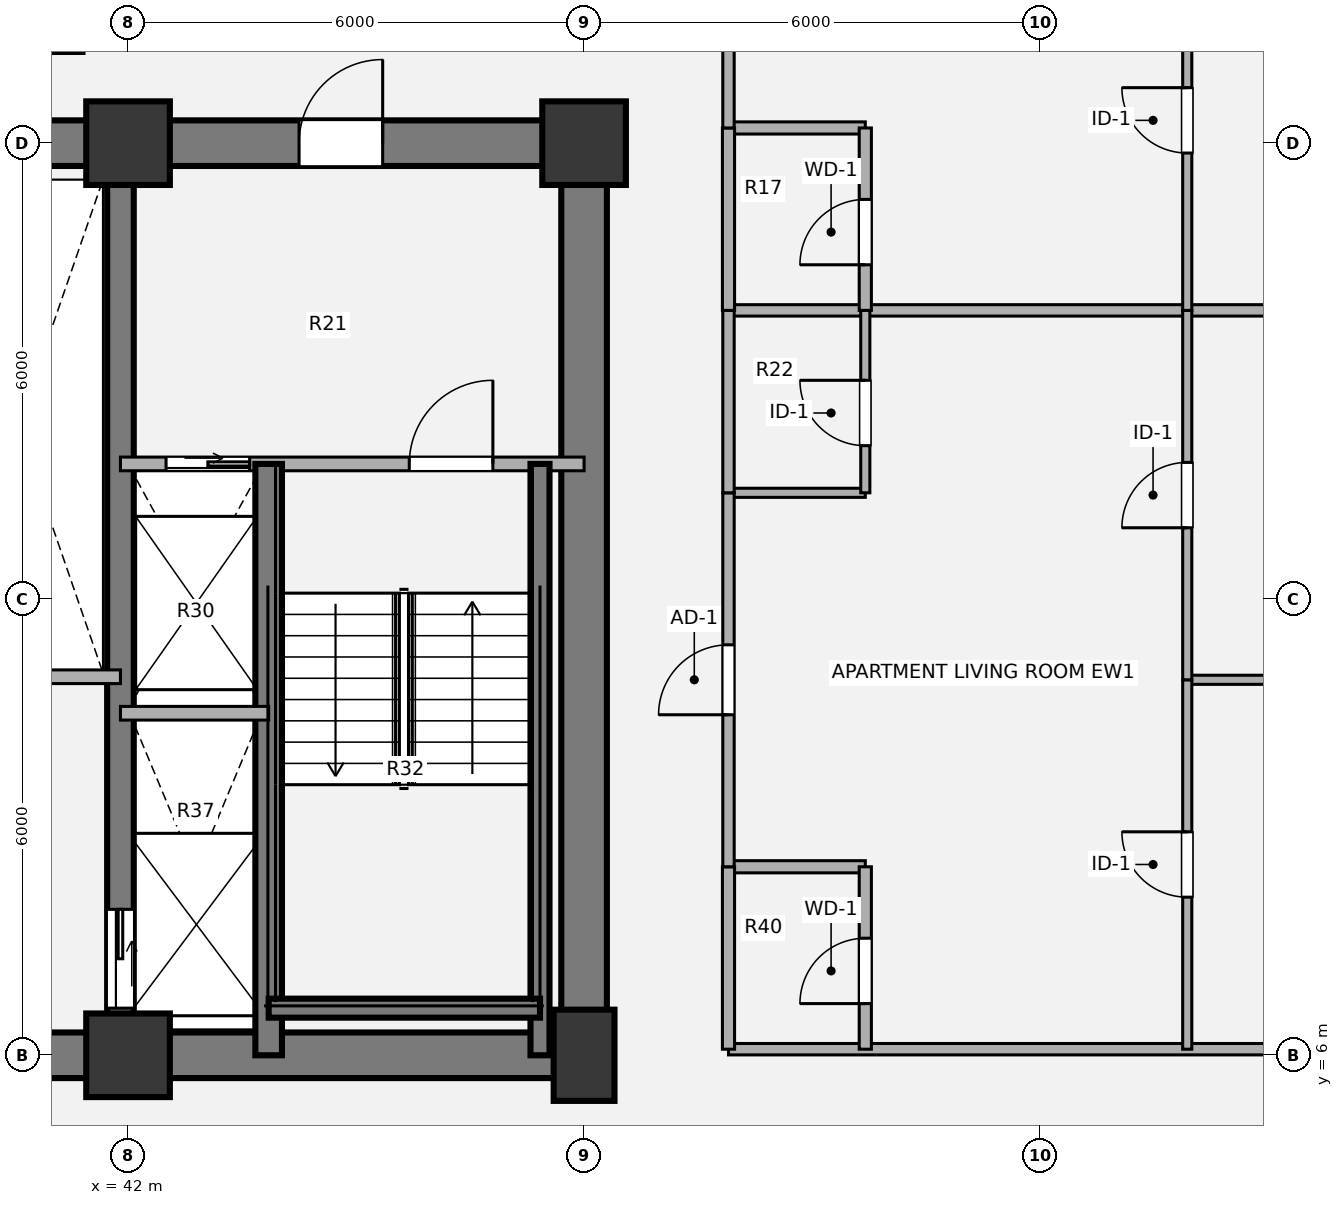
"""IFC4 building model, lengths in metres.
Left out: names, types, materials, properties, quantities, classifications, styles, units other than length and angle.
Written with IfcOpenShell. Run it as: python <this file> out.ifc"""

import sys

from ifc_helpers import new_model, si_unit, direction, frame, frame_2d, origin, origin_2d, place, context, subcontext, project, spatial, rectangle, extrude, source, transform, mapped, element, fill, save


model = new_model("IFC4")
c1 = context("Model", 3, precision=1e-05, world=origin(), true_north=direction((0.0, 1.0)))
c2 = subcontext(c1, "Body", "Model", "MODEL_VIEW")
j1 = project(units=[si_unit("LENGTHUNIT", "METRE"), si_unit("PLANEANGLEUNIT", "RADIAN")], contexts=[c1])
p1 = place(None, origin())
s1 = spatial("IfcSite", under=j1, at=p1, CompositionType="ELEMENT")
p2 = place(p1, origin())
s2 = spatial("IfcBuilding", under=s1, at=p2, CompositionType="ELEMENT")
p3 = place(p2, frame((0.0, 0.0, 76.14)))
s3 = spatial("IfcBuildingStorey", under=s2, at=p3, CompositionType="ELEMENT", Elevation=76.14)
m1 = source(origin(), c2, "Body", "SweptSolid", [
    extrude(rectangle(XDim=1.1, YDim=1.1, at=origin_2d()), origin(), (0.0, 0.0, 1.0), 3.78),
])
p4 = place(p3, frame((42.0, 6.0, 0.0), z_axis=(0.0, 0.0, 1.0), x_axis=(1.0, 0.0, 0.0)))
e1 = element("IfcColumn", 1, at=p4, inside=s3, PredefinedType="COLUMN", context=c2, shape_type="MappedRepresentation", body=[
    mapped(m1, transform((0.0, 0.0, 0.0), x_axis=(1.0, 0.0, 0.0), y_axis=(0.0, 1.0, 0.0), z_axis=(0.0, 0.0, 1.0), scale=1.0)),
])
m2 = source(origin(), c2, "Body", "SweptSolid", [
    extrude(rectangle(XDim=0.8, YDim=1.2, at=origin_2d()), origin(), (0.0, 0.0, 1.0), 3.78),
])
p5 = place(p3, frame((48.0, 6.0, 0.0), z_axis=(0.0, 0.0, 1.0), x_axis=(1.0, 0.0, 0.0)))
e2 = element("IfcColumn", 2, at=p5, inside=s3, PredefinedType="COLUMN", context=c2, shape_type="MappedRepresentation", body=[
    mapped(m2, transform((0.0, 0.0, 0.0), x_axis=(1.0, 0.0, 0.0), y_axis=(0.0, 1.0, 0.0), z_axis=(0.0, 0.0, 1.0), scale=1.0)),
])
for number, where, z_axis, x_axis in (
    (3, (42.0, 18.0, 0.0), (0.0, 0.0, 1.0), (1.0, 0.0, 0.0)),
    (4, (48.0, 18.0, 0.0), (0.0, 0.0, 1.0), (1.0, 0.0, 0.0)),
):
    element("IfcColumn", number, at=place(p3, frame(where, z_axis=z_axis, x_axis=x_axis)), inside=s3, PredefinedType="COLUMN", context=c2, shape_type="MappedRepresentation", body=[
        mapped(m1, transform((0.0, 0.0, 0.0), x_axis=(1.0, 0.0, 0.0), y_axis=(0.0, 1.0, 0.0), z_axis=(0.0, 0.0, 1.0), scale=1.0)),
    ])
p6 = place(p3, frame((48.3, 6.0, 0.0), z_axis=(0.0, 0.0, 1.0), x_axis=(-1.0, 0.0, 0.0)))
e5 = element("IfcWall", 5, at=p6, inside=s3, PredefinedType="SHEAR", context=c2, shape_type="SweptSolid", body=[
    extrude(rectangle(XDim=24.6, YDim=0.6, at=frame_2d((12.3, 0.0))), origin(), (0.0, 0.0, 1.0), 3.78),
])
p7 = place(p3, frame((48.0, 18.0, 0.0), z_axis=(0.0, 0.0, 1.0), x_axis=(0.0, -1.0, 0.0)))
e6 = element("IfcWall", 6, at=p7, inside=s3, PredefinedType="SHEAR", context=c2, shape_type="SweptSolid", body=[
    extrude(rectangle(XDim=12.0, YDim=0.6, at=frame_2d((6.0, 0.0))), origin(), (0.0, 0.0, 1.0), 3.78),
])
p8 = place(p3, frame((38.8, 18.0, 0.0), z_axis=(0.0, 0.0, 1.0), x_axis=(1.0, 0.0, 0.0)))
e7 = element("IfcWall", 7, at=p8, inside=s3, PredefinedType="SHEAR", context=c2, shape_type="SweptSolid", body=[
    extrude(rectangle(XDim=9.5, YDim=0.6, at=frame_2d((4.75, 0.0))), origin(), (0.0, 0.0, 1.0), 3.78),
])
p9 = place(p8, frame((5.45, 0.0, 0.0)))
e8 = element("IfcOpeningElement", 8, at=p9, cuts=e7, PredefinedType="OPENING", context=c2, shape_type="SweptSolid", body=[
    extrude(rectangle(XDim=1.1, YDim=2.1, at=origin_2d()), frame((0.55, 0.31, 1.05), z_axis=(0.0, -1.0, 0.0), x_axis=(1.0, 0.0, 0.0)), (0.0, 0.0, 1.0), 0.62),
])
p10 = place(p3, frame((41.9, 18.0, 0.0), z_axis=(0.0, 0.0, 1.0), x_axis=(0.0, -1.0, 0.0)))
e9 = element("IfcWall", 9, at=p10, inside=s3, PredefinedType="SHEAR", context=c2, shape_type="SweptSolid", body=[
    extrude(rectangle(XDim=12.0, YDim=0.35, at=frame_2d((6.0, 0.0))), origin(), (0.0, 0.0, 1.0), 3.78),
])
p11 = place(p10, frame((10.08, 0.0, 0.0)))
e10 = element("IfcOpeningElement", 10, at=p11, cuts=e9, PredefinedType="OPENING", context=c2, shape_type="SweptSolid", body=[
    extrude(rectangle(XDim=1.3, YDim=2.1, at=origin_2d()), frame((0.65, 0.185, 1.05), z_axis=(0.0, -1.0, 0.0), x_axis=(1.0, 0.0, 0.0)), (0.0, 0.0, 1.0), 0.37),
])
p12 = place(p3, frame((39.35, 10.98, 0.0), z_axis=(0.0, 0.0, 1.0), x_axis=(1.0, 0.0, 0.0)))
e11 = element("IfcWall", 11, at=p12, inside=s3, PredefinedType="PARTITIONING", context=c2, shape_type="SweptSolid", body=[
    extrude(rectangle(XDim=2.55, YDim=0.18, at=frame_2d((1.275, 0.0))), origin(), (0.0, 0.0, 1.0), 3.342),
])
p13 = place(p3, frame((41.9, 13.78, 0.0), z_axis=(0.0, 0.0, 1.0), x_axis=(1.0, 0.0, 0.0)))
e12 = element("IfcWall", 12, at=p13, inside=s3, PredefinedType="PARTITIONING", context=c2, shape_type="SweptSolid", body=[
    extrude(rectangle(XDim=6.1, YDim=0.18, at=frame_2d((3.05, 0.0))), origin(), (0.0, 0.0, 1.0), 3.342),
])
p14 = place(p13, frame((0.6, 0.0, 0.0)))
e13 = element("IfcOpeningElement", 13, at=p14, cuts=e12, PredefinedType="OPENING", context=c2, shape_type="SweptSolid", body=[
    extrude(rectangle(XDim=1.1, YDim=2.1, at=origin_2d()), frame((0.55, 0.1, 1.05), z_axis=(0.0, -1.0, 0.0), x_axis=(1.0, 0.0, 0.0)), (0.0, 0.0, 1.0), 0.2),
])
p15 = place(p13, frame((3.8, 0.0, 0.0)))
e14 = element("IfcOpeningElement", 14, at=p15, cuts=e12, PredefinedType="OPENING", context=c2, shape_type="SweptSolid", body=[
    extrude(rectangle(XDim=1.1, YDim=2.1, at=origin_2d()), frame((0.55, 0.1, 1.05), z_axis=(0.0, -1.0, 0.0), x_axis=(1.0, 0.0, 0.0)), (0.0, 0.0, 1.0), 0.2),
])
p16 = place(p3, frame((43.85, 6.0, 0.0), z_axis=(0.0, 0.0, 1.0), x_axis=(0.0, 1.0, 0.0)))
e15 = element("IfcWall", 15, at=p16, inside=s3, PredefinedType="SHEAR", context=c2, shape_type="SweptSolid", body=[
    extrude(rectangle(XDim=7.78, YDim=0.35, at=frame_2d((3.89, 0.0))), origin(), (0.0, 0.0, 1.0), 3.692),
])
p17 = place(p3, frame((47.42, 6.0, 0.0), z_axis=(0.0, 0.0, 1.0), x_axis=(0.0, 1.0, 0.0)))
e16 = element("IfcWall", 16, at=p17, inside=s3, PredefinedType="SHEAR", context=c2, shape_type="SweptSolid", body=[
    extrude(rectangle(XDim=7.78, YDim=0.25, at=frame_2d((3.89, 0.0))), origin(), (0.0, 0.0, 1.0), 3.692),
])
p18 = place(p3, frame((43.85, 6.62, 0.0), z_axis=(0.0, 0.0, 1.0), x_axis=(1.0, 0.0, 0.0)))
e17 = element("IfcWall", 17, at=p18, inside=s3, PredefinedType="SHEAR", context=c2, shape_type="SweptSolid", body=[
    extrude(rectangle(XDim=3.57, YDim=0.25, at=frame_2d((1.785, 0.0))), origin(), (0.0, 0.0, 1.0), 3.692),
])
p19 = place(p3, frame((41.9, 10.5, 0.0), z_axis=(0.0, 0.0, 1.0), x_axis=(1.0, 0.0, 0.0)))
e18 = element("IfcWall", 18, at=p19, inside=s3, PredefinedType="PARTITIONING", context=c2, shape_type="SweptSolid", body=[
    extrude(rectangle(XDim=1.95, YDim=0.18, at=frame_2d((0.975, 0.0))), origin(), (0.0, 0.0, 1.0), 3.342),
])
p20 = place(p3, frame((49.9, 6.08, 0.0), z_axis=(0.0, 0.0, 1.0), x_axis=(1.0, 0.0, 0.0)))
e19 = element("IfcWall", 19, at=p20, inside=s3, PredefinedType="PARTITIONING", context=c2, shape_type="SweptSolid", body=[
    extrude(rectangle(XDim=10.02, YDim=0.15, at=frame_2d((5.01, 0.0))), origin(), (0.0, 0.0, 1.0), 3.342),
])
p21 = place(p3, frame((49.9, 8.48, 0.0), z_axis=(0.0, 0.0, 1.0), x_axis=(1.0, 0.0, 0.0)))
e20 = element("IfcWall", 20, at=p21, inside=s3, PredefinedType="PLUMBINGWALL", context=c2, shape_type="SweptSolid", body=[
    extrude(rectangle(XDim=1.8, YDim=0.16, at=frame_2d((0.9, 0.0))), origin(), (0.0, 0.0, 1.0), 3.342),
])
p22 = place(p3, frame((55.936, 10.94, 0.0), z_axis=(0.0, 0.0, 1.0), x_axis=(1.0, 0.0, 0.0)))
e21 = element("IfcWall", 21, at=p22, inside=s3, PredefinedType="PARTITIONING", context=c2, shape_type="SweptSolid", body=[
    extrude(rectangle(XDim=3.984, YDim=0.12, at=frame_2d((1.992, 0.0))), origin(), (0.0, 0.0, 1.0), 3.342),
])
p23 = place(p3, frame((49.9, 13.4, 0.0), z_axis=(0.0, 0.0, 1.0), x_axis=(1.0, 0.0, 0.0)))
e22 = element("IfcWall", 22, at=p23, inside=s3, PredefinedType="PARTITIONING", context=c2, shape_type="SweptSolid", body=[
    extrude(rectangle(XDim=1.8, YDim=0.12, at=frame_2d((0.9, 0.0))), origin(), (0.0, 0.0, 1.0), 3.342),
])
p24 = place(p3, frame((49.9, 15.8, 0.0), z_axis=(0.0, 0.0, 1.0), x_axis=(1.0, 0.0, 0.0)))
e23 = element("IfcWall", 23, at=p24, inside=s3, PredefinedType="PARTITIONING", context=c2, shape_type="SweptSolid", body=[
    extrude(rectangle(XDim=10.02, YDim=0.15, at=frame_2d((5.01, 0.0))), origin(), (0.0, 0.0, 1.0), 3.342),
])
p25 = place(p3, frame((49.9, 18.2, 0.0), z_axis=(0.0, 0.0, 1.0), x_axis=(1.0, 0.0, 0.0)))
e24 = element("IfcWall", 24, at=p25, inside=s3, PredefinedType="PLUMBINGWALL", context=c2, shape_type="SweptSolid", body=[
    extrude(rectangle(XDim=1.8, YDim=0.16, at=frame_2d((0.9, 0.0))), origin(), (0.0, 0.0, 1.0), 1.857),
])
p26 = place(p3, frame((49.9, 6.08, 0.0), z_axis=(0.0, 0.0, 1.0), x_axis=(0.0, 1.0, 0.0)))
e25 = element("IfcWall", 25, at=p26, inside=s3, PredefinedType="PLUMBINGWALL", context=c2, shape_type="SweptSolid", body=[
    extrude(rectangle(XDim=2.4, YDim=0.16, at=frame_2d((1.2, 0.0))), origin(), (0.0, 0.0, 1.0), 3.342),
])
p27 = place(p3, frame((49.9, 8.48, 0.0), z_axis=(0.0, 0.0, 1.0), x_axis=(0.0, 1.0, 0.0)))
e26 = element("IfcWall", 26, at=p27, inside=s3, PredefinedType="PARTITIONING", context=c2, shape_type="SweptSolid", body=[
    extrude(rectangle(XDim=4.92, YDim=0.15, at=frame_2d((2.46, 0.0))), origin(), (0.0, 0.0, 1.0), 3.342),
])
p28 = place(p27, frame((2.0, 0.0, 0.0)))
e27 = element("IfcOpeningElement", 27, at=p28, cuts=e26, PredefinedType="OPENING", context=c2, shape_type="SweptSolid", body=[
    extrude(rectangle(XDim=0.92, YDim=2.1, at=origin_2d()), frame((0.46, 0.085, 1.05), z_axis=(0.0, -1.0, 0.0), x_axis=(1.0, 0.0, 0.0)), (0.0, 0.0, 1.0), 0.17),
])
p29 = place(p3, frame((49.9, 13.4, 0.0), z_axis=(0.0, 0.0, 1.0), x_axis=(0.0, 1.0, 0.0)))
e28 = element("IfcWall", 28, at=p29, inside=s3, PredefinedType="PARTITIONING", context=c2, shape_type="SweptSolid", body=[
    extrude(rectangle(XDim=2.4, YDim=0.15, at=frame_2d((1.2, 0.0))), origin(), (0.0, 0.0, 1.0), 3.342),
])
p30 = place(p3, frame((49.9, 15.8, 0.0), z_axis=(0.0, 0.0, 1.0), x_axis=(0.0, 1.0, 0.0)))
e29 = element("IfcWall", 29, at=p30, inside=s3, PredefinedType="PLUMBINGWALL", context=c2, shape_type="SweptSolid", body=[
    extrude(rectangle(XDim=2.4, YDim=0.16, at=frame_2d((1.2, 0.0))), origin(), (0.0, 0.0, 1.0), 3.342),
])
p31 = place(p3, frame((49.9, 18.2, 0.0), z_axis=(0.0, 0.0, 1.0), x_axis=(0.0, 1.0, 0.0)))
e30 = element("IfcWall", 30, at=p31, inside=s3, PredefinedType="PARTITIONING", context=c2, shape_type="SweptSolid", body=[
    extrude(rectangle(XDim=5.2, YDim=0.15, at=frame_2d((2.6, 0.0))), origin(), (0.0, 0.0, 1.0), 3.342),
])
p32 = place(p31, frame((2.14, 0.0, 0.0)))
e31 = element("IfcOpeningElement", 31, at=p32, cuts=e30, PredefinedType="OPENING", context=c2, shape_type="SweptSolid", body=[
    extrude(rectangle(XDim=0.92, YDim=2.1, at=origin_2d()), frame((0.46, 0.085, 1.05), z_axis=(0.0, -1.0, 0.0), x_axis=(1.0, 0.0, 0.0)), (0.0, 0.0, 1.0), 0.17),
])
p33 = place(p3, frame((51.7, 6.08, 0.0), z_axis=(0.0, 0.0, 1.0), x_axis=(0.0, 1.0, 0.0)))
e32 = element("IfcWall", 32, at=p33, inside=s3, PredefinedType="PLUMBINGWALL", context=c2, shape_type="SweptSolid", body=[
    extrude(rectangle(XDim=2.4, YDim=0.16, at=frame_2d((1.2, 0.0))), origin(), (0.0, 0.0, 1.0), 3.342),
])
p34 = place(p33, frame((0.6, 0.0, 0.0)))
e33 = element("IfcOpeningElement", 33, at=p34, cuts=e32, PredefinedType="OPENING", context=c2, shape_type="SweptSolid", body=[
    extrude(rectangle(XDim=0.86, YDim=2.1, at=origin_2d()), frame((0.43, 0.09, 1.05), z_axis=(0.0, -1.0, 0.0), x_axis=(1.0, 0.0, 0.0)), (0.0, 0.0, 1.0), 0.18),
])
p35 = place(p3, frame((51.7, 13.4, 0.0), z_axis=(0.0, 0.0, 1.0), x_axis=(0.0, 1.0, 0.0)))
e34 = element("IfcWall", 34, at=p35, inside=s3, PredefinedType="PARTITIONING", context=c2, shape_type="SweptSolid", body=[
    extrude(rectangle(XDim=2.4, YDim=0.12, at=frame_2d((1.2, 0.0))), origin(), (0.0, 0.0, 1.0), 3.342),
])
p36 = place(p35, frame((0.62, 0.0, 0.0)))
e35 = element("IfcOpeningElement", 35, at=p36, cuts=e34, PredefinedType="OPENING", context=c2, shape_type="SweptSolid", body=[
    extrude(rectangle(XDim=0.86, YDim=2.1, at=origin_2d()), frame((0.43, 0.07, 1.05), z_axis=(0.0, -1.0, 0.0), x_axis=(1.0, 0.0, 0.0)), (0.0, 0.0, 1.0), 0.14),
])
p37 = place(p3, frame((51.7, 15.8, 0.0), z_axis=(0.0, 0.0, 1.0), x_axis=(0.0, 1.0, 0.0)))
e36 = element("IfcWall", 36, at=p37, inside=s3, PredefinedType="PLUMBINGWALL", context=c2, shape_type="SweptSolid", body=[
    extrude(rectangle(XDim=2.4, YDim=0.16, at=frame_2d((1.2, 0.0))), origin(), (0.0, 0.0, 1.0), 3.342),
])
p38 = place(p37, frame((0.6, 0.0, 0.0)))
e37 = element("IfcOpeningElement", 37, at=p38, cuts=e36, PredefinedType="OPENING", context=c2, shape_type="SweptSolid", body=[
    extrude(rectangle(XDim=0.86, YDim=2.1, at=origin_2d()), frame((0.43, 0.09, 1.05), z_axis=(0.0, -1.0, 0.0), x_axis=(1.0, 0.0, 0.0)), (0.0, 0.0, 1.0), 0.18),
])
p39 = place(p3, frame((55.936, 6.08, 0.0), z_axis=(0.0, 0.0, 1.0), x_axis=(0.0, 1.0, 0.0)))
e38 = element("IfcWall", 38, at=p39, inside=s3, PredefinedType="PARTITIONING", context=c2, shape_type="SweptSolid", body=[
    extrude(rectangle(XDim=4.86, YDim=0.12, at=frame_2d((2.43, 0.0))), origin(), (0.0, 0.0, 1.0), 3.342),
])
p40 = place(p39, frame((2.0, 0.0, 0.0)))
e39 = element("IfcOpeningElement", 39, at=p40, cuts=e38, PredefinedType="OPENING", context=c2, shape_type="SweptSolid", body=[
    extrude(rectangle(XDim=0.86, YDim=2.1, at=origin_2d()), frame((0.43, 0.07, 1.05), z_axis=(0.0, -1.0, 0.0), x_axis=(1.0, 0.0, 0.0)), (0.0, 0.0, 1.0), 0.14),
])
p41 = place(p3, frame((55.936, 10.94, 0.0), z_axis=(0.0, 0.0, 1.0), x_axis=(0.0, 1.0, 0.0)))
e40 = element("IfcWall", 40, at=p41, inside=s3, PredefinedType="PARTITIONING", context=c2, shape_type="SweptSolid", body=[
    extrude(rectangle(XDim=4.86, YDim=0.12, at=frame_2d((2.43, 0.0))), origin(), (0.0, 0.0, 1.0), 3.342),
])
p42 = place(p41, frame((2.0, 0.0, 0.0)))
e41 = element("IfcOpeningElement", 41, at=p42, cuts=e40, PredefinedType="OPENING", context=c2, shape_type="SweptSolid", body=[
    extrude(rectangle(XDim=0.86, YDim=2.1, at=origin_2d()), frame((0.43, 0.07, 1.05), z_axis=(0.0, -1.0, 0.0), x_axis=(1.0, 0.0, 0.0)), (0.0, 0.0, 1.0), 0.14),
])
p43 = place(p3, frame((55.936, 15.8, 0.0), z_axis=(0.0, 0.0, 1.0), x_axis=(0.0, 1.0, 0.0)))
e42 = element("IfcWall", 42, at=p43, inside=s3, PredefinedType="PARTITIONING", context=c2, shape_type="SweptSolid", body=[
    extrude(rectangle(XDim=5.0, YDim=0.12, at=frame_2d((2.5, 0.0))), origin(), (0.0, 0.0, 1.0), 3.342),
])
p44 = place(p43, frame((2.07, 0.0, 0.0)))
e43 = element("IfcOpeningElement", 43, at=p44, cuts=e42, PredefinedType="OPENING", context=c2, shape_type="SweptSolid", body=[
    extrude(rectangle(XDim=0.86, YDim=2.1, at=origin_2d()), frame((0.43, 0.07, 1.05), z_axis=(0.0, -1.0, 0.0), x_axis=(1.0, 0.0, 0.0)), (0.0, 0.0, 1.0), 0.14),
])
m3 = source(origin(), c2, "Body", "SweptSolid", [
    extrude(rectangle(XDim=1.1, YDim=2.1, at=origin_2d()), frame((0.55, 0.025, 1.05), z_axis=(0.0, -1.0, 0.0), x_axis=(1.0, 0.0, 0.0)), (0.0, 0.0, 1.0), 0.05),
])
p45 = place(p14, origin())
e44 = element("IfcDoor", 44, at=p45, inside=s3, OperationType="SLIDING_TO_RIGHT", PredefinedType="DOOR", context=c2, shape_type="MappedRepresentation", body=[
    mapped(m3, transform((0.0, 0.0, 0.0), x_axis=(1.0, 0.0, 0.0), y_axis=(0.0, 1.0, 0.0), z_axis=(0.0, 0.0, 1.0), scale=1.0)),
])
fill(e13, e44)
m4 = source(origin(), c2, "Body", "SweptSolid", [
    extrude(rectangle(XDim=1.1, YDim=2.1, at=origin_2d()), frame((0.55, 0.025, 1.05), z_axis=(0.0, -1.0, 0.0), x_axis=(1.0, 0.0, 0.0)), (0.0, 0.0, 1.0), 0.05),
])
p46 = place(p15, origin())
e45 = element("IfcDoor", 45, at=p46, inside=s3, OperationType="SINGLE_SWING_RIGHT", PredefinedType="DOOR", context=c2, shape_type="MappedRepresentation", body=[
    mapped(m4, transform((0.0, 0.0, 0.0), x_axis=(1.0, 0.0, 0.0), y_axis=(0.0, 1.0, 0.0), z_axis=(0.0, 0.0, 1.0), scale=1.0)),
])
fill(e14, e45)
m5 = source(origin(), c2, "Body", "SweptSolid", [
    extrude(rectangle(XDim=1.3, YDim=2.1, at=origin_2d()), frame((0.65, 0.025, 1.05), z_axis=(0.0, -1.0, 0.0), x_axis=(1.0, 0.0, 0.0)), (0.0, 0.0, 1.0), 0.05),
])
p47 = place(p11, origin())
e46 = element("IfcDoor", 46, at=p47, inside=s3, OperationType="SLIDING_TO_LEFT", PredefinedType="DOOR", context=c2, shape_type="MappedRepresentation", body=[
    mapped(m5, transform((0.0, 0.0, 0.0), x_axis=(1.0, 0.0, 0.0), y_axis=(0.0, 1.0, 0.0), z_axis=(0.0, 0.0, 1.0), scale=1.0)),
])
fill(e10, e46)
m6 = source(origin(), c2, "Body", "SweptSolid", [
    extrude(rectangle(XDim=1.1, YDim=2.1, at=origin_2d()), frame((0.55, 0.025, 1.05), z_axis=(0.0, -1.0, 0.0), x_axis=(1.0, 0.0, 0.0)), (0.0, 0.0, 1.0), 0.05),
])
p48 = place(p9, origin())
e47 = element("IfcDoor", 47, at=p48, inside=s3, OperationType="SINGLE_SWING_RIGHT", PredefinedType="DOOR", context=c2, shape_type="MappedRepresentation", body=[
    mapped(m6, transform((0.0, 0.0, 0.0), x_axis=(1.0, 0.0, 0.0), y_axis=(0.0, 1.0, 0.0), z_axis=(0.0, 0.0, 1.0), scale=1.0)),
])
fill(e8, e47)
m7 = source(origin(), c2, "Body", "SweptSolid", [
    extrude(rectangle(XDim=0.92, YDim=2.1, at=origin_2d()), frame((0.46, 0.025, 1.05), z_axis=(0.0, -1.0, 0.0), x_axis=(1.0, 0.0, 0.0)), (0.0, 0.0, 1.0), 0.05),
])
p49 = place(p28, origin())
e48 = element("IfcDoor", 48, at=p49, inside=s3, OperationType="SINGLE_SWING_LEFT", PredefinedType="DOOR", context=c2, shape_type="MappedRepresentation", body=[
    mapped(m7, transform((0.0, 0.0, 0.0), x_axis=(1.0, 0.0, 0.0), y_axis=(0.0, 1.0, 0.0), z_axis=(0.0, 0.0, 1.0), scale=1.0)),
])
fill(e27, e48)
m8 = source(origin(), c2, "Body", "SweptSolid", [
    extrude(rectangle(XDim=0.86, YDim=2.1, at=origin_2d()), frame((0.43, 0.025, 1.05), z_axis=(0.0, -1.0, 0.0), x_axis=(1.0, 0.0, 0.0)), (0.0, 0.0, 1.0), 0.05),
])
p50 = place(p34, origin())
e49 = element("IfcDoor", 49, at=p50, inside=s3, OperationType="SINGLE_SWING_LEFT", PredefinedType="DOOR", context=c2, shape_type="MappedRepresentation", body=[
    mapped(m8, transform((0.0, 0.0, 0.0), x_axis=(1.0, 0.0, 0.0), y_axis=(0.0, 1.0, 0.0), z_axis=(0.0, 0.0, 1.0), scale=1.0)),
])
fill(e33, e49)
m9 = source(origin(), c2, "Body", "SweptSolid", [
    extrude(rectangle(XDim=0.86, YDim=2.1, at=origin_2d()), frame((0.43, 0.025, 1.05), z_axis=(0.0, -1.0, 0.0), x_axis=(1.0, 0.0, 0.0)), (0.0, 0.0, 1.0), 0.05),
])
p51 = place(p36, origin())
e50 = element("IfcDoor", 50, at=p51, inside=s3, OperationType="SINGLE_SWING_RIGHT", PredefinedType="DOOR", context=c2, shape_type="MappedRepresentation", body=[
    mapped(m9, transform((0.0, 0.0, 0.0), x_axis=(1.0, 0.0, 0.0), y_axis=(0.0, 1.0, 0.0), z_axis=(0.0, 0.0, 1.0), scale=1.0)),
])
fill(e35, e50)
p52 = place(p38, origin())
e51 = element("IfcDoor", 51, at=p52, inside=s3, OperationType="SINGLE_SWING_LEFT", PredefinedType="DOOR", context=c2, shape_type="MappedRepresentation", body=[
    mapped(m8, transform((0.0, 0.0, 0.0), x_axis=(1.0, 0.0, 0.0), y_axis=(0.0, 1.0, 0.0), z_axis=(0.0, 0.0, 1.0), scale=1.0)),
])
fill(e37, e51)
p53 = place(p40, origin())
e52 = element("IfcDoor", 52, at=p53, inside=s3, OperationType="SINGLE_SWING_RIGHT", PredefinedType="DOOR", context=c2, shape_type="MappedRepresentation", body=[
    mapped(m9, transform((0.0, 0.0, 0.0), x_axis=(1.0, 0.0, 0.0), y_axis=(0.0, 1.0, 0.0), z_axis=(0.0, 0.0, 1.0), scale=1.0)),
])
fill(e39, e52)
p54 = place(p42, origin())
e53 = element("IfcDoor", 53, at=p54, inside=s3, OperationType="SINGLE_SWING_LEFT", PredefinedType="DOOR", context=c2, shape_type="MappedRepresentation", body=[
    mapped(m9, transform((0.0, 0.0, 0.0), x_axis=(1.0, 0.0, 0.0), y_axis=(0.0, 1.0, 0.0), z_axis=(0.0, 0.0, 1.0), scale=1.0)),
])
fill(e41, e53)
p55 = place(p44, origin())
e54 = element("IfcDoor", 54, at=p55, inside=s3, OperationType="SINGLE_SWING_RIGHT", PredefinedType="DOOR", context=c2, shape_type="MappedRepresentation", body=[
    mapped(m9, transform((0.0, 0.0, 0.0), x_axis=(1.0, 0.0, 0.0), y_axis=(0.0, 1.0, 0.0), z_axis=(0.0, 0.0, 1.0), scale=1.0)),
])
fill(e43, e54)
save(model, sys.argv[1])
